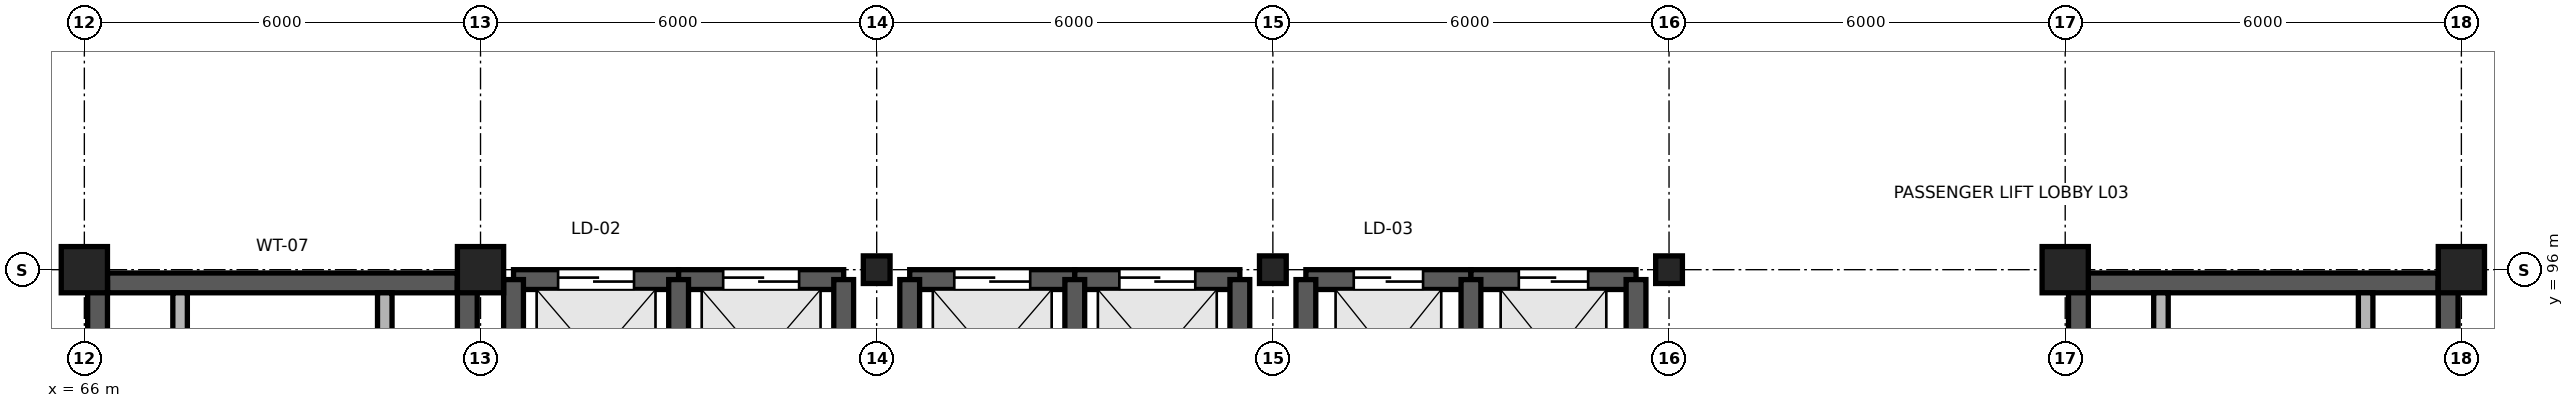
"""IFC4 building model, lengths in metres.
Left out: names, types, materials, properties, quantities, classifications, styles, units other than length and angle.
Written with IfcOpenShell. Run it as: python <this file> out.ifc"""

import sys

from ifc_helpers import new_model, si_unit, direction, frame, frame_2d, origin, origin_2d, place, context, subcontext, project, spatial, rectangle, i_section, extrude, element, fill, save


model = new_model("IFC4")
c1 = context("Model", 3, precision=1e-05, world=origin(), true_north=direction((0.0, 1.0)))
c2 = subcontext(c1, "Body", "Model", "MODEL_VIEW")
j1 = project(units=[si_unit("LENGTHUNIT", "METRE"), si_unit("PLANEANGLEUNIT", "RADIAN")], contexts=[c1])
p1 = place(None, origin())
s1 = spatial("IfcSite", under=j1, at=p1, CompositionType="ELEMENT")
p2 = place(p1, origin())
s2 = spatial("IfcBuilding", under=s1, at=p2, CompositionType="ELEMENT")
p3 = place(p2, frame((0.0, 0.0, 12.0)))
s3 = spatial("IfcBuildingStorey", under=s2, at=p3, CompositionType="ELEMENT", Elevation=12.0)
for number, where, z_axis, x_axis in (
    (1, (66.0, 96.0, 0.0), (0.0, 0.0, 1.0), (1.0, 0.0, 0.0)),
    (2, (72.0, 96.0, 0.0), (0.0, 0.0, 1.0), (1.0, 0.0, 0.0)),
):
    element("IfcColumn", number, at=place(p3, frame(where, z_axis=z_axis, x_axis=x_axis)), inside=s3, PredefinedType="COLUMN", context=c2, shape_type="SweptSolid", body=[
        extrude(rectangle(XDim=0.7, YDim=0.7, at=origin_2d()), origin(), (0.0, 0.0, 1.0), 4.5),
    ])
for number, where, z_axis, x_axis in (
    (3, (78.0, 96.0, 0.0), (0.0, 0.0, 1.0), (1.0, 0.0, 0.0)),
    (4, (84.0, 96.0, 0.0), (0.0, 0.0, 1.0), (1.0, 0.0, 0.0)),
    (5, (90.0, 96.0, 0.0), (0.0, 0.0, 1.0), (1.0, 0.0, 0.0)),
):
    element("IfcColumn", number, at=place(p3, frame(where, z_axis=z_axis, x_axis=x_axis)), inside=s3, PredefinedType="COLUMN", context=c2, shape_type="SweptSolid", body=[
        extrude(i_section(OverallWidth=0.405, OverallDepth=0.418, WebThickness=0.02, FlangeThickness=0.03, FilletRadius=0.022, at=origin_2d()), origin(), (0.0, 0.0, 1.0), 4.5),
    ])
for number, where, z_axis, x_axis in (
    (6, (96.0, 96.0, 0.0), (0.0, 0.0, 1.0), (1.0, 0.0, 0.0)),
    (7, (102.0, 96.0, 0.0), (0.0, 0.0, 1.0), (1.0, 0.0, 0.0)),
):
    element("IfcColumn", number, at=place(p3, frame(where, z_axis=z_axis, x_axis=x_axis)), inside=s3, PredefinedType="COLUMN", context=c2, shape_type="SweptSolid", body=[
        extrude(rectangle(XDim=0.7, YDim=0.7, at=origin_2d()), origin(), (0.0, 0.0, 1.0), 4.5),
    ])
p4 = place(p3, frame((66.35, 95.8, 0.0), z_axis=(0.0, 0.0, 1.0), x_axis=(1.0, 0.0, 0.0)))
e8 = element("IfcWall", 8, at=p4, inside=s3, PredefinedType="SHEAR", context=c2, shape_type="SweptSolid", body=[
    extrude(rectangle(XDim=5.3, YDim=0.3, at=frame_2d((2.65, 0.0))), origin(), (0.0, 0.0, 1.0), 4.22),
])
for number, where, z_axis, x_axis in (
    (9, (66.2, 84.0, 0.0), (0.0, 0.0, 1.0), (0.0, 1.0, 0.0)),
    (10, (71.8, 84.0, 0.0), (0.0, 0.0, 1.0), (0.0, 1.0, 0.0)),
):
    element("IfcWall", number, at=place(p3, frame(where, z_axis=z_axis, x_axis=x_axis)), inside=s3, PredefinedType="SHEAR", context=c2, shape_type="SweptSolid", body=[
        extrude(rectangle(XDim=11.8, YDim=0.3, at=frame_2d((5.9, 0.0))), origin(), (0.0, 0.0, 1.0), 4.22),
    ])
for number, where, z_axis, x_axis in (
    (11, (67.45, 94.4, 0.0), (0.0, 0.0, 1.0), (0.0, 1.0, 0.0)),
    (12, (70.55, 94.4, 0.0), (0.0, 0.0, 1.0), (0.0, 1.0, 0.0)),
):
    element("IfcWall", number, at=place(p3, frame(where, z_axis=z_axis, x_axis=x_axis)), inside=s3, PredefinedType="PARTITIONING", context=c2, shape_type="SweptSolid", body=[
        extrude(rectangle(XDim=1.25, YDim=0.22, at=frame_2d((0.625, 0.0))), origin(), (0.0, 0.0, 1.0), 4.22),
    ])
p5 = place(p3, frame((96.35, 95.8, 0.0), z_axis=(0.0, 0.0, 1.0), x_axis=(1.0, 0.0, 0.0)))
e13 = element("IfcWall", 13, at=p5, inside=s3, PredefinedType="SHEAR", context=c2, shape_type="SweptSolid", body=[
    extrude(rectangle(XDim=5.3, YDim=0.3, at=frame_2d((2.65, 0.0))), origin(), (0.0, 0.0, 1.0), 4.22),
])
for number, where, z_axis, x_axis in (
    (14, (96.2, 84.0, 0.0), (0.0, 0.0, 1.0), (0.0, 1.0, 0.0)),
    (15, (101.8, 84.0, 0.0), (0.0, 0.0, 1.0), (0.0, 1.0, 0.0)),
):
    element("IfcWall", number, at=place(p3, frame(where, z_axis=z_axis, x_axis=x_axis)), inside=s3, PredefinedType="SHEAR", context=c2, shape_type="SweptSolid", body=[
        extrude(rectangle(XDim=11.8, YDim=0.3, at=frame_2d((5.9, 0.0))), origin(), (0.0, 0.0, 1.0), 4.22),
    ])
for number, where, z_axis, x_axis in (
    (16, (97.45, 94.4, 0.0), (0.0, 0.0, 1.0), (0.0, 1.0, 0.0)),
    (17, (100.55, 94.4, 0.0), (0.0, 0.0, 1.0), (0.0, 1.0, 0.0)),
):
    element("IfcWall", number, at=place(p3, frame(where, z_axis=z_axis, x_axis=x_axis)), inside=s3, PredefinedType="PARTITIONING", context=c2, shape_type="SweptSolid", body=[
        extrude(rectangle(XDim=1.25, YDim=0.22, at=frame_2d((0.625, 0.0))), origin(), (0.0, 0.0, 1.0), 4.22),
    ])
p6 = place(p3, frame((72.5, 95.85, 0.0), z_axis=(0.0, 0.0, 1.0), x_axis=(1.0, 0.0, 0.0)))
e18 = element("IfcWall", 18, at=p6, inside=s3, PredefinedType="SHEAR", context=c2, shape_type="SweptSolid", body=[
    extrude(rectangle(XDim=2.5, YDim=0.3, at=frame_2d((1.25, 0.0))), origin(), (0.0, 0.0, 1.0), 4.22),
])
p7 = place(p6, frame((0.675, 0.0, 0.0)))
e19 = element("IfcOpeningElement", 19, at=p7, cuts=e18, PredefinedType="OPENING", context=c2, shape_type="SweptSolid", body=[
    extrude(rectangle(XDim=1.15, YDim=2.15, at=frame_2d((0.575, 1.075))), frame((0.0, 0.165, 0.0), z_axis=(0.0, -1.0, 0.0), x_axis=(1.0, 0.0, 0.0)), (0.0, 0.0, 1.0), 0.33),
])
p8 = place(p3, frame((72.5, 92.45, 0.0), z_axis=(0.0, 0.0, 1.0), x_axis=(0.0, 1.0, 0.0)))
e20 = element("IfcWall", 20, at=p8, inside=s3, PredefinedType="SHEAR", context=c2, shape_type="SweptSolid", body=[
    extrude(rectangle(XDim=3.4, YDim=0.3, at=frame_2d((1.7, 0.0))), origin(), (0.0, 0.0, 1.0), 4.22),
])
p9 = place(p3, frame((75.0, 95.85, 0.0), z_axis=(0.0, 0.0, 1.0), x_axis=(1.0, 0.0, 0.0)))
e21 = element("IfcWall", 21, at=p9, inside=s3, PredefinedType="SHEAR", context=c2, shape_type="SweptSolid", body=[
    extrude(rectangle(XDim=2.5, YDim=0.3, at=frame_2d((1.25, 0.0))), origin(), (0.0, 0.0, 1.0), 4.22),
])
p10 = place(p9, frame((0.675, 0.0, 0.0)))
e22 = element("IfcOpeningElement", 22, at=p10, cuts=e21, PredefinedType="OPENING", context=c2, shape_type="SweptSolid", body=[
    extrude(rectangle(XDim=1.15, YDim=2.15, at=frame_2d((0.575, 1.075))), frame((0.0, 0.165, 0.0), z_axis=(0.0, -1.0, 0.0), x_axis=(1.0, 0.0, 0.0)), (0.0, 0.0, 1.0), 0.33),
])
for number, where, z_axis, x_axis in (
    (23, (75.0, 92.45, 0.0), (0.0, 0.0, 1.0), (0.0, 1.0, 0.0)),
    (24, (77.5, 92.45, 0.0), (0.0, 0.0, 1.0), (0.0, 1.0, 0.0)),
):
    element("IfcWall", number, at=place(p3, frame(where, z_axis=z_axis, x_axis=x_axis)), inside=s3, PredefinedType="SHEAR", context=c2, shape_type="SweptSolid", body=[
        extrude(rectangle(XDim=3.4, YDim=0.3, at=frame_2d((1.7, 0.0))), origin(), (0.0, 0.0, 1.0), 4.22),
    ])
p11 = place(p3, frame((78.5, 95.85, 0.0), z_axis=(0.0, 0.0, 1.0), x_axis=(1.0, 0.0, 0.0)))
e25 = element("IfcWall", 25, at=p11, inside=s3, PredefinedType="SHEAR", context=c2, shape_type="SweptSolid", body=[
    extrude(rectangle(XDim=2.5, YDim=0.3, at=frame_2d((1.25, 0.0))), origin(), (0.0, 0.0, 1.0), 4.22),
])
p12 = place(p11, frame((0.675, 0.0, 0.0)))
e26 = element("IfcOpeningElement", 26, at=p12, cuts=e25, PredefinedType="OPENING", context=c2, shape_type="SweptSolid", body=[
    extrude(rectangle(XDim=1.15, YDim=2.15, at=frame_2d((0.575, 1.075))), frame((0.0, 0.165, 0.0), z_axis=(0.0, -1.0, 0.0), x_axis=(1.0, 0.0, 0.0)), (0.0, 0.0, 1.0), 0.33),
])
p13 = place(p3, frame((78.5, 92.45, 0.0), z_axis=(0.0, 0.0, 1.0), x_axis=(0.0, 1.0, 0.0)))
e27 = element("IfcWall", 27, at=p13, inside=s3, PredefinedType="SHEAR", context=c2, shape_type="SweptSolid", body=[
    extrude(rectangle(XDim=3.4, YDim=0.3, at=frame_2d((1.7, 0.0))), origin(), (0.0, 0.0, 1.0), 4.22),
])
p14 = place(p3, frame((81.0, 95.85, 0.0), z_axis=(0.0, 0.0, 1.0), x_axis=(1.0, 0.0, 0.0)))
e28 = element("IfcWall", 28, at=p14, inside=s3, PredefinedType="SHEAR", context=c2, shape_type="SweptSolid", body=[
    extrude(rectangle(XDim=2.5, YDim=0.3, at=frame_2d((1.25, 0.0))), origin(), (0.0, 0.0, 1.0), 4.22),
])
p15 = place(p14, frame((0.675, 0.0, 0.0)))
e29 = element("IfcOpeningElement", 29, at=p15, cuts=e28, PredefinedType="OPENING", context=c2, shape_type="SweptSolid", body=[
    extrude(rectangle(XDim=1.15, YDim=2.15, at=frame_2d((0.575, 1.075))), frame((0.0, 0.165, 0.0), z_axis=(0.0, -1.0, 0.0), x_axis=(1.0, 0.0, 0.0)), (0.0, 0.0, 1.0), 0.33),
])
for number, where, z_axis, x_axis in (
    (30, (81.0, 92.45, 0.0), (0.0, 0.0, 1.0), (0.0, 1.0, 0.0)),
    (31, (83.5, 92.45, 0.0), (0.0, 0.0, 1.0), (0.0, 1.0, 0.0)),
):
    element("IfcWall", number, at=place(p3, frame(where, z_axis=z_axis, x_axis=x_axis)), inside=s3, PredefinedType="SHEAR", context=c2, shape_type="SweptSolid", body=[
        extrude(rectangle(XDim=3.4, YDim=0.3, at=frame_2d((1.7, 0.0))), origin(), (0.0, 0.0, 1.0), 4.22),
    ])
p16 = place(p3, frame((84.5, 95.85, 0.0), z_axis=(0.0, 0.0, 1.0), x_axis=(1.0, 0.0, 0.0)))
e32 = element("IfcWall", 32, at=p16, inside=s3, PredefinedType="SHEAR", context=c2, shape_type="SweptSolid", body=[
    extrude(rectangle(XDim=2.5, YDim=0.3, at=frame_2d((1.25, 0.0))), origin(), (0.0, 0.0, 1.0), 4.22),
])
p17 = place(p16, frame((0.725, 0.0, 0.0)))
e33 = element("IfcOpeningElement", 33, at=p17, cuts=e32, PredefinedType="OPENING", context=c2, shape_type="SweptSolid", body=[
    extrude(rectangle(XDim=1.05, YDim=2.1, at=frame_2d((0.525, 1.05))), frame((0.0, 0.165, 0.0), z_axis=(0.0, -1.0, 0.0), x_axis=(1.0, 0.0, 0.0)), (0.0, 0.0, 1.0), 0.33),
])
p18 = place(p3, frame((84.5, 92.45, 0.0), z_axis=(0.0, 0.0, 1.0), x_axis=(0.0, 1.0, 0.0)))
e34 = element("IfcWall", 34, at=p18, inside=s3, PredefinedType="SHEAR", context=c2, shape_type="SweptSolid", body=[
    extrude(rectangle(XDim=3.4, YDim=0.3, at=frame_2d((1.7, 0.0))), origin(), (0.0, 0.0, 1.0), 4.22),
])
p19 = place(p3, frame((87.0, 95.85, 0.0), z_axis=(0.0, 0.0, 1.0), x_axis=(1.0, 0.0, 0.0)))
e35 = element("IfcWall", 35, at=p19, inside=s3, PredefinedType="SHEAR", context=c2, shape_type="SweptSolid", body=[
    extrude(rectangle(XDim=2.5, YDim=0.3, at=frame_2d((1.25, 0.0))), origin(), (0.0, 0.0, 1.0), 4.22),
])
p20 = place(p19, frame((0.725, 0.0, 0.0)))
e36 = element("IfcOpeningElement", 36, at=p20, cuts=e35, PredefinedType="OPENING", context=c2, shape_type="SweptSolid", body=[
    extrude(rectangle(XDim=1.05, YDim=2.1, at=frame_2d((0.525, 1.05))), frame((0.0, 0.165, 0.0), z_axis=(0.0, -1.0, 0.0), x_axis=(1.0, 0.0, 0.0)), (0.0, 0.0, 1.0), 0.33),
])
for number, where, z_axis, x_axis in (
    (37, (87.0, 92.45, 0.0), (0.0, 0.0, 1.0), (0.0, 1.0, 0.0)),
    (38, (89.5, 92.45, 0.0), (0.0, 0.0, 1.0), (0.0, 1.0, 0.0)),
):
    element("IfcWall", number, at=place(p3, frame(where, z_axis=z_axis, x_axis=x_axis)), inside=s3, PredefinedType="SHEAR", context=c2, shape_type="SweptSolid", body=[
        extrude(rectangle(XDim=3.4, YDim=0.3, at=frame_2d((1.7, 0.0))), origin(), (0.0, 0.0, 1.0), 4.22),
    ])
p21 = place(p7, origin())
e39 = element("IfcDoor", 39, at=p21, inside=s3, OperationType="DOUBLE_DOOR_SLIDING", PredefinedType="DOOR", context=c2, shape_type="SweptSolid", body=[
    extrude(rectangle(XDim=1.15, YDim=2.15, at=frame_2d((0.575, 1.075))), frame((0.0, 0.025, 0.0), z_axis=(0.0, -1.0, 0.0), x_axis=(1.0, 0.0, 0.0)), (0.0, 0.0, 1.0), 0.05),
])
fill(e19, e39)
p22 = place(p10, origin())
e40 = element("IfcDoor", 40, at=p22, inside=s3, OperationType="DOUBLE_DOOR_SLIDING", PredefinedType="DOOR", context=c2, shape_type="SweptSolid", body=[
    extrude(rectangle(XDim=1.15, YDim=2.15, at=frame_2d((0.575, 1.075))), frame((0.0, 0.025, 0.0), z_axis=(0.0, -1.0, 0.0), x_axis=(1.0, 0.0, 0.0)), (0.0, 0.0, 1.0), 0.05),
])
fill(e22, e40)
p23 = place(p12, origin())
e41 = element("IfcDoor", 41, at=p23, inside=s3, OperationType="DOUBLE_DOOR_SLIDING", PredefinedType="DOOR", context=c2, shape_type="SweptSolid", body=[
    extrude(rectangle(XDim=1.15, YDim=2.15, at=frame_2d((0.575, 1.075))), frame((0.0, 0.025, 0.0), z_axis=(0.0, -1.0, 0.0), x_axis=(1.0, 0.0, 0.0)), (0.0, 0.0, 1.0), 0.05),
])
fill(e26, e41)
p24 = place(p15, origin())
e42 = element("IfcDoor", 42, at=p24, inside=s3, OperationType="DOUBLE_DOOR_SLIDING", PredefinedType="DOOR", context=c2, shape_type="SweptSolid", body=[
    extrude(rectangle(XDim=1.15, YDim=2.15, at=frame_2d((0.575, 1.075))), frame((0.0, 0.025, 0.0), z_axis=(0.0, -1.0, 0.0), x_axis=(1.0, 0.0, 0.0)), (0.0, 0.0, 1.0), 0.05),
])
fill(e29, e42)
p25 = place(p17, origin())
e43 = element("IfcDoor", 43, at=p25, inside=s3, OperationType="DOUBLE_DOOR_SLIDING", PredefinedType="DOOR", context=c2, shape_type="SweptSolid", body=[
    extrude(rectangle(XDim=1.05, YDim=2.1, at=frame_2d((0.525, 1.05))), frame((0.0, 0.025, 0.0), z_axis=(0.0, -1.0, 0.0), x_axis=(1.0, 0.0, 0.0)), (0.0, 0.0, 1.0), 0.05),
])
fill(e33, e43)
p26 = place(p20, origin())
e44 = element("IfcDoor", 44, at=p26, inside=s3, OperationType="DOUBLE_DOOR_SLIDING", PredefinedType="DOOR", context=c2, shape_type="SweptSolid", body=[
    extrude(rectangle(XDim=1.05, YDim=2.1, at=frame_2d((0.525, 1.05))), frame((0.0, 0.025, 0.0), z_axis=(0.0, -1.0, 0.0), x_axis=(1.0, 0.0, 0.0)), (0.0, 0.0, 1.0), 0.05),
])
fill(e36, e44)
save(model, sys.argv[1])
